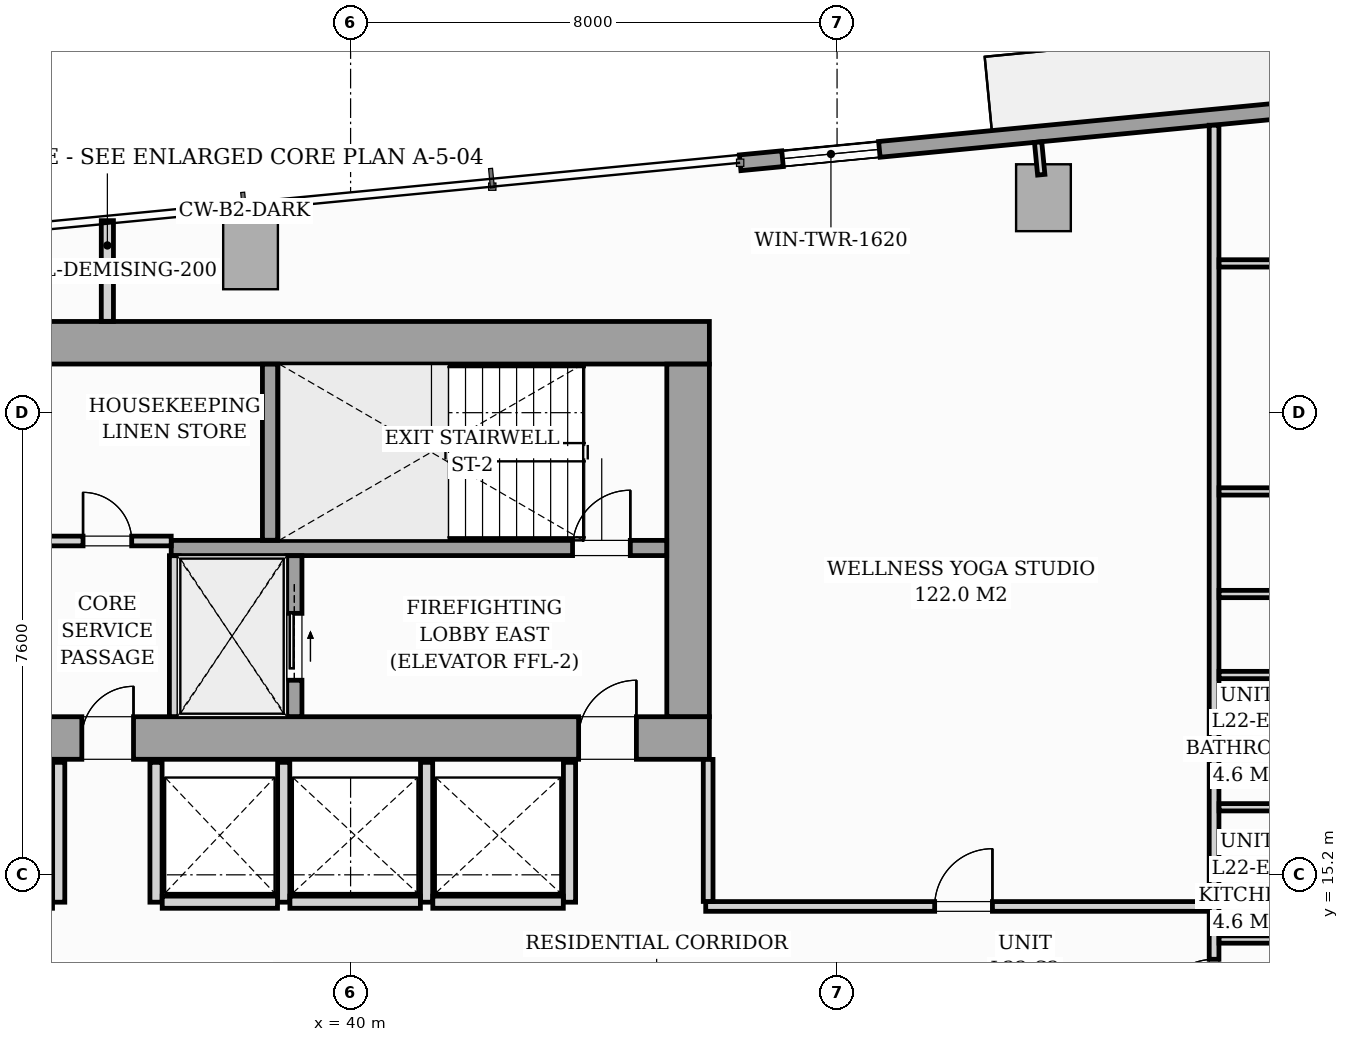
"""IFC4 building model, lengths in metres.
Left out: names, types, materials, properties, quantities, classifications, styles, units other than length and angle.
Written with IfcOpenShell. Run it as: python <this file> out.ifc"""

import sys

from ifc_helpers import new_model, si_unit, direction, frame, frame_2d, origin, origin_2d, place, context, subcontext, project, spatial, rectangle, i_section, extrude, source, transform, mapped, element, fill, save


model = new_model("IFC4")
c1 = context("Model", 3, precision=1e-05, world=origin(), true_north=direction((0.0, 1.0)))
c2 = subcontext(c1, "Body", "Model", "MODEL_VIEW")
j1 = project(units=[si_unit("LENGTHUNIT", "METRE"), si_unit("PLANEANGLEUNIT", "RADIAN")], contexts=[c1])
p1 = place(None, origin())
s1 = spatial("IfcSite", under=j1, at=p1, CompositionType="ELEMENT")
p2 = place(p1, origin())
s2 = spatial("IfcBuilding", under=s1, at=p2, CompositionType="ELEMENT")
p3 = place(p2, frame((0.0, 0.0, 81.0)))
s3 = spatial("IfcBuildingStorey", under=s2, at=p3, CompositionType="ELEMENT", Elevation=81.0)
m1 = source(origin(), c2, "Body", "SweptSolid", [
    extrude(i_section(OverallWidth=0.427, OverallDepth=0.483, WebThickness=0.051, FlangeThickness=0.082, FilletRadius=0.018, at=origin_2d()), origin(), (0.0, 0.0, 1.0), 3.196),
])
for number, where, z_axis, x_axis in (
    (1, (38.88, 17.4, 0.002), (0.0, 0.0, 1.0), (1.0, 0.0, 0.0)),
    (2, (45.6, 17.4, 0.002), (0.0, 0.0, 1.0), (1.0, 0.0, 0.0)),
    (3, (38.88, 24.0, 0.002), (0.0, 0.0, 1.0), (1.0, 0.0, 0.0)),
    (4, (45.6, 24.0, 0.002), (0.0, 0.0, 1.0), (1.0, 0.0, 0.0)),
):
    element("IfcColumn", number, at=place(p3, frame(where, z_axis=z_axis, x_axis=x_axis)), inside=s3, PredefinedType="PILASTER", context=c2, shape_type="MappedRepresentation", body=[
        mapped(m1, transform((0.0, 0.0, 0.0), scale=1.0)),
    ])
m2 = source(origin(), c2, "Body", "SweptSolid", [
    extrude(rectangle(XDim=0.9, YDim=1.1, at=origin_2d()), origin(), (0.0, 0.0, 1.0), 3.196),
])
for number, where, z_axis, x_axis in (
    (5, (38.354, 25.38, 0.002), (0.0, 0.0, 1.0), (0.995, 0.096, 0.0)),
    (6, (51.394, 26.335, 0.002), (0.0, 0.0, 1.0), (0.995, 0.096, 0.0)),
):
    element("IfcColumn", number, at=place(p3, frame(where, z_axis=z_axis, x_axis=x_axis)), inside=s3, PredefinedType="COLUMN", context=c2, shape_type="MappedRepresentation", body=[
        mapped(m2, transform((0.0, 0.0, 0.0), scale=1.0)),
    ])
p4 = place(p3, frame((46.406, 26.91, 0.0), z_axis=(0.0, 0.0, 1.0), x_axis=(0.995396638587, 0.095841180552, 0.0)))
e7 = element("IfcWall", 7, at=p4, inside=s3, PredefinedType="STANDARD", context=c2, shape_type="SweptSolid", body=[
    extrude(rectangle(XDim=19.11, YDim=0.26, at=frame_2d((9.555, 0.0))), origin(), (0.0, 0.0, 1.0), 2.94),
])
p5 = place(p4, frame((9.69, 0.0, 0.0)))
e8 = element("IfcOpeningElement", 8, at=p5, cuts=e7, PredefinedType="OPENING", context=c2, shape_type="SweptSolid", body=[
    extrude(rectangle(XDim=1.8, YDim=2.06, at=frame_2d((0.9, 1.03))), frame((0.0, 0.14, 0.0), z_axis=(0.0, -1.0, 0.0), x_axis=(1.0, 0.0, 0.0)), (0.0, 0.0, 1.0), 0.28),
])
p6 = place(p4, frame((0.7, 0.0, 0.65)))
e9 = element("IfcOpeningElement", 9, at=p6, cuts=e7, PredefinedType="OPENING", context=c2, shape_type="SweptSolid", body=[
    extrude(rectangle(XDim=1.6, YDim=1.5, at=frame_2d((0.8, 0.75))), frame((0.0, 0.14, 0.0), z_axis=(0.0, -1.0, 0.0), x_axis=(1.0, 0.0, 0.0)), (0.0, 0.0, 1.0), 0.28),
])
p7 = place(p3, frame((26.1, 17.45, 0.0), z_axis=(0.0, 0.0, 1.0), x_axis=(1.0, 0.0, 0.0)))
e10 = element("IfcWall", 10, at=p7, inside=s3, PredefinedType="SHEAR", context=c2, shape_type="SweptSolid", body=[
    extrude(rectangle(XDim=19.8, YDim=0.7, at=frame_2d((9.9, 0.0))), origin(), (0.0, 0.0, 1.0), 3.2),
])
p8 = place(p7, frame((1.05, 0.0, 0.0)))
e11 = element("IfcOpeningElement", 11, at=p8, cuts=e10, PredefinedType="OPENING", context=c2, shape_type="SweptSolid", body=[
    extrude(rectangle(XDim=0.95, YDim=2.06, at=frame_2d((0.475, 1.03))), frame((0.0, 0.36, 0.0), z_axis=(0.0, -1.0, 0.0), x_axis=(1.0, 0.0, 0.0)), (0.0, 0.0, 1.0), 0.72),
])
p9 = place(p7, frame((9.48, 0.0, 0.0)))
e12 = element("IfcOpeningElement", 12, at=p9, cuts=e10, PredefinedType="OPENING", context=c2, shape_type="SweptSolid", body=[
    extrude(rectangle(XDim=0.85, YDim=2.0, at=frame_2d((0.425, 1.0))), frame((0.0, 0.36, 0.0), z_axis=(0.0, -1.0, 0.0), x_axis=(1.0, 0.0, 0.0)), (0.0, 0.0, 1.0), 0.72),
])
p10 = place(p7, frame((17.65, 0.0, 0.0)))
e13 = element("IfcOpeningElement", 13, at=p10, cuts=e10, PredefinedType="OPENING", context=c2, shape_type="SweptSolid", body=[
    extrude(rectangle(XDim=0.95, YDim=2.06, at=frame_2d((0.475, 1.03))), frame((0.0, 0.36, 0.0), z_axis=(0.0, -1.0, 0.0), x_axis=(1.0, 0.0, 0.0)), (0.0, 0.0, 1.0), 0.72),
])
p11 = place(p3, frame((26.1, 23.95, 0.0), z_axis=(0.0, 0.0, 1.0), x_axis=(1.0, 0.0, 0.0)))
e14 = element("IfcWall", 14, at=p11, inside=s3, PredefinedType="SHEAR", context=c2, shape_type="SweptSolid", body=[
    extrude(rectangle(XDim=19.8, YDim=0.7, at=frame_2d((9.9, 0.0))), origin(), (0.0, 0.0, 1.0), 3.2),
])
p12 = place(p3, frame((45.55, 17.802, 0.0), z_axis=(0.0, 0.0, 1.0), x_axis=(0.0, 1.0, 0.0)))
e15 = element("IfcWall", 15, at=p12, inside=s3, PredefinedType="SHEAR", context=c2, shape_type="SweptSolid", body=[
    extrude(rectangle(XDim=5.796, YDim=0.7, at=frame_2d((2.898, 0.0))), origin(), (0.0, 0.0, 1.0), 3.2),
])
p13 = place(p3, frame((37.05, 20.575, 0.0), z_axis=(0.0, 0.0, 1.0), x_axis=(1.0, 0.0, 0.0)))
e16 = element("IfcWall", 16, at=p13, inside=s3, PredefinedType="SOLIDWALL", context=c2, shape_type="SweptSolid", body=[
    extrude(rectangle(XDim=8.148, YDim=0.25, at=frame_2d((4.074, 0.0))), origin(), (0.0, 0.0, 1.0), 3.2),
])
p14 = place(p13, frame((6.6, 0.0, 0.0)))
e17 = element("IfcOpeningElement", 17, at=p14, cuts=e16, PredefinedType="OPENING", context=c2, shape_type="SweptSolid", body=[
    extrude(rectangle(XDim=0.95, YDim=2.06, at=frame_2d((0.475, 1.03))), frame((0.0, 0.135, 0.0), z_axis=(0.0, -1.0, 0.0), x_axis=(1.0, 0.0, 0.0)), (0.0, 0.0, 1.0), 0.27),
])
p15 = place(p3, frame((38.675, 20.702, 0.0), z_axis=(0.0, 0.0, 1.0), x_axis=(0.0, 1.0, 0.0)))
e18 = element("IfcWall", 18, at=p15, inside=s3, PredefinedType="SOLIDWALL", context=c2, shape_type="SweptSolid", body=[
    extrude(rectangle(XDim=2.896, YDim=0.25, at=frame_2d((1.448, 0.0))), origin(), (0.0, 0.0, 1.0), 3.2),
])
p16 = place(p3, frame((37.1, 17.802, 0.0), z_axis=(0.0, 0.0, 1.0), x_axis=(0.0, 1.0, 0.0)))
e19 = element("IfcWall", 19, at=p16, inside=s3, PredefinedType="PARTITIONING", context=c2, shape_type="SweptSolid", body=[
    extrude(rectangle(XDim=2.646, YDim=0.16, at=frame_2d((1.323, 0.0))), origin(), (0.0, 0.0, 1.0), 2.94),
])
p17 = place(p3, frame((39.075, 17.802, 0.0), z_axis=(0.0, 0.0, 1.0), x_axis=(0.0, 1.0, 0.0)))
e20 = element("IfcWall", 20, at=p17, inside=s3, PredefinedType="SOLIDWALL", context=c2, shape_type="SweptSolid", body=[
    extrude(rectangle(XDim=2.646, YDim=0.25, at=frame_2d((1.323, 0.0))), origin(), (0.0, 0.0, 1.0), 3.2),
])
p18 = place(p17, frame((0.598, 0.0, 0.0)))
e21 = element("IfcOpeningElement", 21, at=p18, cuts=e20, PredefinedType="OPENING", context=c2, shape_type="SweptSolid", body=[
    extrude(rectangle(XDim=1.1, YDim=2.08, at=frame_2d((0.55, 1.04))), frame((0.0, 0.135, 0.0), z_axis=(0.0, -1.0, 0.0), x_axis=(1.0, 0.0, 0.0)), (0.0, 0.0, 1.0), 0.27),
])
p19 = place(p3, frame((34.95, 20.69, 0.0), z_axis=(0.0, 0.0, 1.0), x_axis=(1.0, 0.0, 0.0)))
e22 = element("IfcWall", 22, at=p19, inside=s3, PredefinedType="PARTITIONING", context=c2, shape_type="SweptSolid", body=[
    extrude(rectangle(XDim=2.1, YDim=0.16, at=frame_2d((1.05, 0.0))), origin(), (0.0, 0.0, 1.0), 2.94),
])
p20 = place(p19, frame((0.65, 0.0, 0.0)))
e23 = element("IfcOpeningElement", 23, at=p20, cuts=e22, PredefinedType="OPENING", context=c2, shape_type="SweptSolid", body=[
    extrude(rectangle(XDim=0.8, YDim=2.05, at=frame_2d((0.4, 1.025))), frame((0.0, 0.09, 0.0), z_axis=(0.0, -1.0, 0.0), x_axis=(1.0, 0.0, 0.0)), (0.0, 0.0, 1.0), 0.18),
])
for number, where, z_axis, x_axis in (
    (24, (35.2, 14.75, 0.0), (0.0, 0.0, 1.0), (0.0, 1.0, 0.0)),
    (25, (36.8, 14.75, 0.0), (0.0, 0.0, 1.0), (0.0, 1.0, 0.0)),
    (26, (38.9, 14.75, 0.0), (0.0, 0.0, 1.0), (0.0, 1.0, 0.0)),
):
    element("IfcWall", number, at=place(p3, frame(where, z_axis=z_axis, x_axis=x_axis)), inside=s3, PredefinedType="PARTITIONING", context=c2, shape_type="SweptSolid", body=[
        extrude(rectangle(XDim=2.3, YDim=0.2, at=frame_2d((1.15, 0.0))), origin(), (0.0, 0.0, 1.0), 2.94),
    ])
p21 = place(p3, frame((36.902, 14.75, 0.0), z_axis=(0.0, 0.0, 1.0), x_axis=(1.0, 0.0, 0.0)))
e27 = element("IfcWall", 27, at=p21, inside=s3, PredefinedType="PARTITIONING", context=c2, shape_type="SweptSolid", body=[
    extrude(rectangle(XDim=1.896, YDim=0.2, at=frame_2d((0.948, 0.0))), origin(), (0.0, 0.0, 1.0), 2.94),
])
for number, where, z_axis, x_axis in (
    (28, (41.25, 14.75, 0.0), (0.0, 0.0, 1.0), (0.0, 1.0, 0.0)),
    (29, (43.6, 14.75, 0.0), (0.0, 0.0, 1.0), (0.0, 1.0, 0.0)),
):
    element("IfcWall", number, at=place(p3, frame(where, z_axis=z_axis, x_axis=x_axis)), inside=s3, PredefinedType="PARTITIONING", context=c2, shape_type="SweptSolid", body=[
        extrude(rectangle(XDim=2.3, YDim=0.2, at=frame_2d((1.15, 0.0))), origin(), (0.0, 0.0, 1.0), 2.94),
    ])
for number, where, z_axis, x_axis in (
    (30, (39.002, 14.75, 0.0), (0.0, 0.0, 1.0), (1.0, 0.0, 0.0)),
    (31, (41.352, 14.75, 0.0), (0.0, 0.0, 1.0), (1.0, 0.0, 0.0)),
):
    element("IfcWall", number, at=place(p3, frame(where, z_axis=z_axis, x_axis=x_axis)), inside=s3, PredefinedType="PARTITIONING", context=c2, shape_type="SweptSolid", body=[
        extrude(rectangle(XDim=2.146, YDim=0.2, at=frame_2d((1.073, 0.0))), origin(), (0.0, 0.0, 1.0), 2.94),
    ])
p22 = place(p3, frame((54.2, 12.432, 0.0), z_axis=(0.0, 0.0, 1.0), x_axis=(0.0, 1.0, 0.0)))
e32 = element("IfcWall", 32, at=p22, inside=s3, PredefinedType="PARTITIONING", context=c2, shape_type="SweptSolid", body=[
    extrude(rectangle(XDim=15.095, YDim=0.16, at=frame_2d((7.548, 0.0))), origin(), (0.0, 0.0, 1.0), 2.94),
])
p23 = place(p22, frame((0.429, 0.0, 0.0)))
e33 = element("IfcOpeningElement", 33, at=p23, cuts=e32, PredefinedType="OPENING", context=c2, shape_type="SweptSolid", body=[
    extrude(rectangle(XDim=0.95, YDim=2.06, at=frame_2d((0.475, 1.03))), frame((0.0, 0.09, 0.0), z_axis=(0.0, -1.0, 0.0), x_axis=(1.0, 0.0, 0.0)), (0.0, 0.0, 1.0), 0.18),
])
p24 = place(p3, frame((36.0, 24.302, 0.0), z_axis=(0.0, 0.0, 1.0), x_axis=(0.0, 1.0, 0.0)))
e34 = element("IfcWall", 34, at=p24, inside=s3, PredefinedType="PARTITIONING", context=c2, shape_type="SweptSolid", body=[
    extrude(rectangle(XDim=1.656, YDim=0.2, at=frame_2d((0.828, 0.0))), origin(), (0.0, 0.0, 1.0), 2.94),
])
for number, where, z_axis, x_axis in (
    (35, (54.282, 16.311, 0.0), (0.0, 0.0, 1.0), (1.0, 0.0, 0.0)),
    (36, (54.282, 14.136, 0.0), (0.0, 0.0, 1.0), (1.0, 0.0, 0.0)),
    (37, (54.282, 18.486, 0.0), (0.0, 0.0, 1.0), (1.0, 0.0, 0.0)),
):
    element("IfcWall", number, at=place(p3, frame(where, z_axis=z_axis, x_axis=x_axis)), inside=s3, PredefinedType="PARTITIONING", context=c2, shape_type="SweptSolid", body=[
        extrude(rectangle(XDim=2.256, YDim=0.12, at=frame_2d((1.128, 0.0))), origin(), (0.0, 0.0, 1.0), 2.94),
    ])
p25 = place(p3, frame((54.282, 25.255, 0.0), z_axis=(0.0, 0.0, 1.0), x_axis=(1.0, 0.0, 0.0)))
e38 = element("IfcWall", 38, at=p25, inside=s3, PredefinedType="PARTITIONING", context=c2, shape_type="SweptSolid", body=[
    extrude(rectangle(XDim=6.901, YDim=0.12, at=frame_2d((3.451, 0.0))), origin(), (0.0, 0.0, 1.0), 2.94),
])
p26 = place(p25, frame((3.056, 0.0, 0.0)))
e39 = element("IfcOpeningElement", 39, at=p26, cuts=e38, PredefinedType="OPENING", context=c2, shape_type="SweptSolid", body=[
    extrude(rectangle(XDim=0.85, YDim=2.05, at=frame_2d((0.425, 1.025))), frame((0.0, 0.07, 0.0), z_axis=(0.0, -1.0, 0.0), x_axis=(1.0, 0.0, 0.0)), (0.0, 0.0, 1.0), 0.14),
])
p27 = place(p3, frame((54.282, 21.505, 0.0), z_axis=(0.0, 0.0, 1.0), x_axis=(1.0, 0.0, 0.0)))
e40 = element("IfcWall", 40, at=p27, inside=s3, PredefinedType="PARTITIONING", context=c2, shape_type="SweptSolid", body=[
    extrude(rectangle(XDim=14.274, YDim=0.12, at=frame_2d((7.137, 0.0))), origin(), (0.0, 0.0, 1.0), 2.94),
])
p28 = place(p27, frame((4.853, 0.0, 0.0)))
e41 = element("IfcOpeningElement", 41, at=p28, cuts=e40, PredefinedType="OPENING", context=c2, shape_type="SweptSolid", body=[
    extrude(rectangle(XDim=0.85, YDim=2.05, at=frame_2d((0.425, 1.025))), frame((0.0, 0.07, 0.0), z_axis=(0.0, -1.0, 0.0), x_axis=(1.0, 0.0, 0.0)), (0.0, 0.0, 1.0), 0.14),
])
p29 = place(p3, frame((54.282, 19.818, 0.0), z_axis=(0.0, 0.0, 1.0), x_axis=(1.0, 0.0, 0.0)))
e42 = element("IfcWall", 42, at=p29, inside=s3, PredefinedType="PARTITIONING", context=c2, shape_type="SweptSolid", body=[
    extrude(rectangle(XDim=14.437, YDim=0.12, at=frame_2d((7.218, 0.0))), origin(), (0.0, 0.0, 1.0), 2.94),
])
p30 = place(p29, frame((4.853, 0.0, 0.0)))
e43 = element("IfcOpeningElement", 43, at=p30, cuts=e42, PredefinedType="OPENING", context=c2, shape_type="SweptSolid", body=[
    extrude(rectangle(XDim=0.85, YDim=2.05, at=frame_2d((0.425, 1.025))), frame((0.0, 0.07, 0.0), z_axis=(0.0, -1.0, 0.0), x_axis=(1.0, 0.0, 0.0)), (0.0, 0.0, 1.0), 0.14),
])
p31 = place(p3, frame((45.84, 14.68, 0.0), z_axis=(0.0, 0.0, 1.0), x_axis=(1.0, 0.0, 0.0)))
e44 = element("IfcWall", 44, at=p31, inside=s3, PredefinedType="PARTITIONING", context=c2, shape_type="SweptSolid", body=[
    extrude(rectangle(XDim=8.278, YDim=0.16, at=frame_2d((4.139, 0.0))), origin(), (0.0, 0.0, 1.0), 2.94),
])
p32 = place(p31, frame((3.765, 0.0, 0.0)))
e45 = element("IfcOpeningElement", 45, at=p32, cuts=e44, PredefinedType="OPENING", context=c2, shape_type="SweptSolid", body=[
    extrude(rectangle(XDim=0.95, YDim=2.06, at=frame_2d((0.475, 1.03))), frame((0.0, 0.09, 0.0), z_axis=(0.0, -1.0, 0.0), x_axis=(1.0, 0.0, 0.0)), (0.0, 0.0, 1.0), 0.18),
])
p33 = place(p3, frame((45.88, 14.762, 0.0), z_axis=(0.0, 0.0, 1.0), x_axis=(0.0, 1.0, 0.0)))
e46 = element("IfcWall", 46, at=p33, inside=s3, PredefinedType="PARTITIONING", context=c2, shape_type="SweptSolid", body=[
    extrude(rectangle(XDim=2.336, YDim=0.16, at=frame_2d((1.168, 0.0))), origin(), (0.0, 0.0, 1.0), 2.94),
])
p34 = place(p3, frame((51.358, 26.713, 0.0), z_axis=(0.0, 0.0, 1.0), x_axis=(-0.095772948675, 0.995403205893, 0.0)))
e47 = element("IfcWall", 47, at=p34, inside=s3, PredefinedType="PARTITIONING", context=c2, shape_type="SweptSolid", body=[
    extrude(rectangle(XDim=0.538, YDim=0.12, at=frame_2d((0.269, 0.0))), origin(), (0.0, 0.0, 1.0), 2.94),
])
m3 = source(origin(), c2, "Body", "SweptSolid", [
    extrude(rectangle(XDim=1.6, YDim=1.5, at=frame_2d((0.8, 0.75))), frame((0.0, 0.03, 0.0), z_axis=(0.0, -1.0, 0.0), x_axis=(1.0, 0.0, 0.0)), (0.0, 0.0, 1.0), 0.06),
])
p35 = place(p6, origin())
e48 = element("IfcWindow", 48, at=p35, inside=s3, PartitioningType="SINGLE_PANEL", PredefinedType="WINDOW", context=c2, shape_type="MappedRepresentation", body=[
    mapped(m3, transform((0.0, 0.0, 0.0), scale=1.0)),
])
fill(e9, e48)
m4 = source(origin(), c2, "Body", "SweptSolid", [
    extrude(rectangle(XDim=0.85, YDim=2.0, at=frame_2d((0.425, 1.0))), frame((0.0, 0.025, 0.0), z_axis=(0.0, -1.0, 0.0), x_axis=(1.0, 0.0, 0.0)), (0.0, 0.0, 1.0), 0.05),
])
p36 = place(p9, origin())
e49 = element("IfcDoor", 49, at=p36, inside=s3, OperationType="SINGLE_SWING_RIGHT", PredefinedType="DOOR", context=c2, shape_type="MappedRepresentation", body=[
    mapped(m4, transform((0.0, 0.0, 0.0), scale=1.0)),
])
fill(e12, e49)
m5 = source(origin(), c2, "Body", "SweptSolid", [
    extrude(rectangle(XDim=0.95, YDim=2.06, at=frame_2d((0.475, 1.03))), frame((0.0, 0.025, 0.0), z_axis=(0.0, -1.0, 0.0), x_axis=(1.0, 0.0, 0.0)), (0.0, 0.0, 1.0), 0.05),
])
p37 = place(p10, origin())
e50 = element("IfcDoor", 50, at=p37, inside=s3, OperationType="SINGLE_SWING_RIGHT", PredefinedType="DOOR", context=c2, shape_type="MappedRepresentation", body=[
    mapped(m5, transform((0.0, 0.0, 0.0), scale=1.0)),
])
fill(e13, e50)
p38 = place(p14, origin())
e51 = element("IfcDoor", 51, at=p38, inside=s3, OperationType="SINGLE_SWING_RIGHT", PredefinedType="DOOR", context=c2, shape_type="MappedRepresentation", body=[
    mapped(m5, transform((0.0, 0.0, 0.0), scale=1.0)),
])
fill(e17, e51)
m6 = source(origin(), c2, "Body", "SweptSolid", [
    extrude(rectangle(XDim=1.1, YDim=2.08, at=frame_2d((0.55, 1.04))), frame((0.0, 0.025, 0.0), z_axis=(0.0, -1.0, 0.0), x_axis=(1.0, 0.0, 0.0)), (0.0, 0.0, 1.0), 0.05),
])
p39 = place(p18, origin())
e52 = element("IfcDoor", 52, at=p39, inside=s3, OperationType="SLIDING_TO_RIGHT", PredefinedType="DOOR", context=c2, shape_type="MappedRepresentation", body=[
    mapped(m6, transform((0.0, 0.0, 0.0), scale=1.0)),
])
fill(e21, e52)
m7 = source(origin(), c2, "Body", "SweptSolid", [
    extrude(rectangle(XDim=0.8, YDim=2.05, at=frame_2d((0.4, 1.025))), frame((0.0, 0.025, 0.0), z_axis=(0.0, -1.0, 0.0), x_axis=(1.0, 0.0, 0.0)), (0.0, 0.0, 1.0), 0.05),
])
p40 = place(p20, origin())
e53 = element("IfcDoor", 53, at=p40, inside=s3, OperationType="SINGLE_SWING_LEFT", PredefinedType="DOOR", context=c2, shape_type="MappedRepresentation", body=[
    mapped(m7, transform((0.0, 0.0, 0.0), scale=1.0)),
])
fill(e23, e53)
m8 = source(origin(), c2, "Body", "SweptSolid", [
    extrude(rectangle(XDim=0.95, YDim=2.06, at=frame_2d((0.475, 1.03))), frame((0.0, 0.025, 0.0), z_axis=(0.0, -1.0, 0.0), x_axis=(1.0, 0.0, 0.0)), (0.0, 0.0, 1.0), 0.05),
])
p41 = place(p23, origin())
e54 = element("IfcDoor", 54, at=p41, inside=s3, OperationType="SINGLE_SWING_LEFT", PredefinedType="DOOR", context=c2, shape_type="MappedRepresentation", body=[
    mapped(m8, transform((0.0, 0.0, 0.0), scale=1.0)),
])
fill(e33, e54)
p42 = place(p32, origin())
e55 = element("IfcDoor", 55, at=p42, inside=s3, OperationType="SINGLE_SWING_RIGHT", PredefinedType="DOOR", context=c2, shape_type="MappedRepresentation", body=[
    mapped(m8, transform((0.0, 0.0, 0.0), scale=1.0)),
])
fill(e45, e55)
save(model, sys.argv[1])
